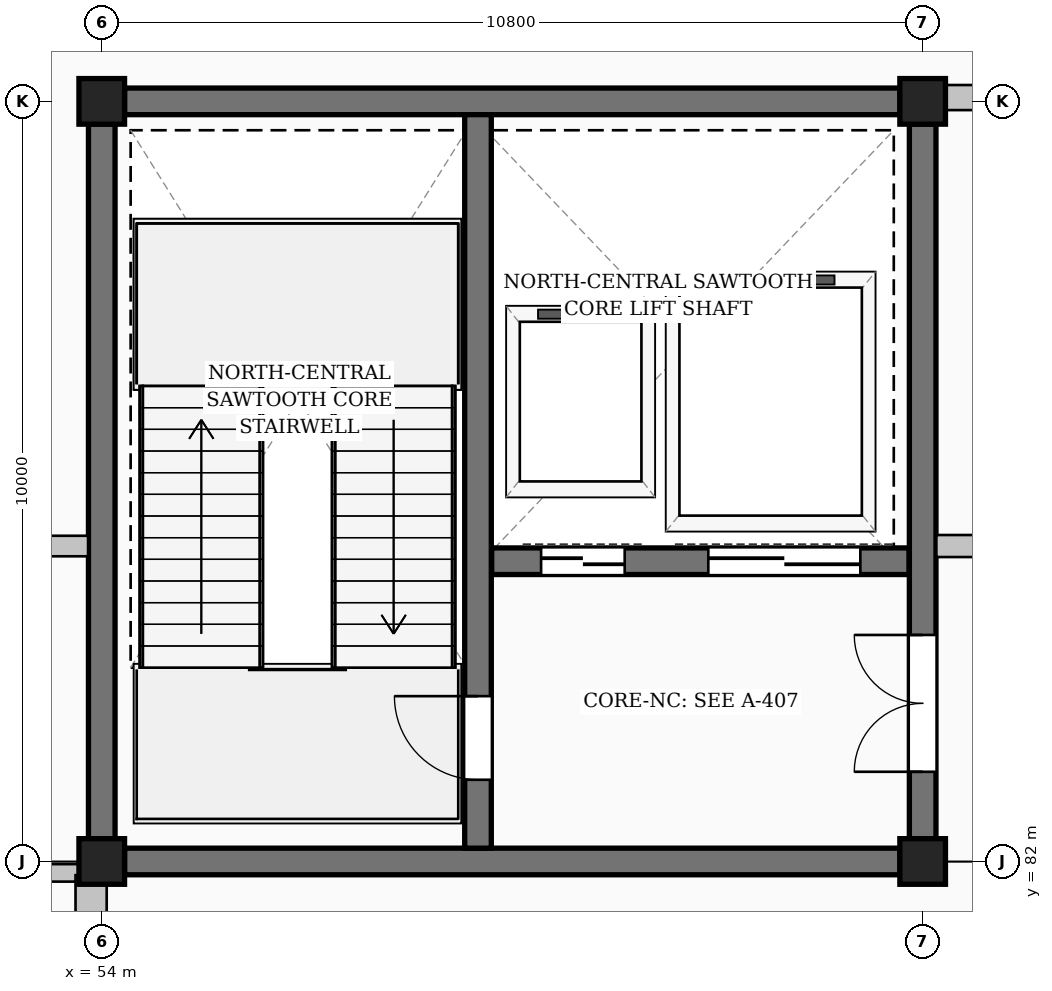
"""IFC4 building model, lengths in metres.
Left out: names, types, materials, properties, quantities, classifications, styles, units other than length and angle.
Written with IfcOpenShell. Run it as: python <this file> out.ifc"""

import sys

from ifc_helpers import new_model, si_unit, direction, frame, frame_2d, origin, origin_2d, place, context, subcontext, project, spatial, rectangle, extrude, element, fill, save


model = new_model("IFC4")
c1 = context("Model", 3, precision=1e-05, world=origin(), true_north=direction((0.0, 1.0)))
c2 = subcontext(c1, "Body", "Model", "MODEL_VIEW")
j1 = project(units=[si_unit("LENGTHUNIT", "METRE"), si_unit("PLANEANGLEUNIT", "RADIAN")], contexts=[c1])
p1 = place(None, origin())
s1 = spatial("IfcSite", under=j1, at=p1, CompositionType="ELEMENT")
p2 = place(p1, origin())
s2 = spatial("IfcBuilding", under=s1, at=p2, CompositionType="ELEMENT")
p3 = place(p2, frame((0.0, 0.0, 14.4)))
s3 = spatial("IfcBuildingStorey", under=s2, at=p3, CompositionType="ELEMENT", Elevation=14.4)
for number, where, z_axis, x_axis in (
    (1, (54.0, 82.0, 0.0), (0.0, 0.0, 1.0), (1.0, 0.0, 0.0)),
    (2, (54.0, 92.0, 0.0), (0.0, 0.0, 1.0), (1.0, 0.0, 0.0)),
    (3, (64.8, 82.0, 0.0), (0.0, 0.0, 1.0), (1.0, 0.0, 0.0)),
    (4, (64.8, 92.0, 0.0), (0.0, 0.0, 1.0), (1.0, 0.0, 0.0)),
):
    element("IfcColumn", number, at=place(p3, frame(where, z_axis=z_axis, x_axis=x_axis)), inside=s3, PredefinedType="COLUMN", context=c2, shape_type="SweptSolid", body=[
        extrude(rectangle(XDim=0.6, YDim=0.6, at=origin_2d()), origin(), (0.0, 0.0, 1.0), 9.6),
    ])
for number, where, z_axis, x_axis in (
    (5, (54.3, 82.0, 0.0), (0.0, 0.0, 1.0), (1.0, 0.0, 0.0)),
    (6, (54.3, 92.0, 0.0), (0.0, 0.0, 1.0), (1.0, 0.0, 0.0)),
):
    element("IfcWall", number, at=place(p3, frame(where, z_axis=z_axis, x_axis=x_axis)), inside=s3, PredefinedType="SHEAR", context=c2, shape_type="SweptSolid", body=[
        extrude(rectangle(XDim=10.2, YDim=0.35, at=frame_2d((5.1, 0.0))), origin(), (0.0, 0.0, 1.0), 9.36),
    ])
p4 = place(p3, frame((54.0, 82.3, 0.0), z_axis=(0.0, 0.0, 1.0), x_axis=(0.0, 1.0, 0.0)))
e7 = element("IfcWall", 7, at=p4, inside=s3, PredefinedType="SHEAR", context=c2, shape_type="SweptSolid", body=[
    extrude(rectangle(XDim=9.4, YDim=0.35, at=frame_2d((4.7, 0.0))), origin(), (0.0, 0.0, 1.0), 9.36),
])
p5 = place(p3, frame((64.8, 82.3, 0.0), z_axis=(0.0, 0.0, 1.0), x_axis=(0.0, 1.0, 0.0)))
e8 = element("IfcWall", 8, at=p5, inside=s3, PredefinedType="SHEAR", context=c2, shape_type="SweptSolid", body=[
    extrude(rectangle(XDim=9.4, YDim=0.35, at=frame_2d((4.7, 0.0))), origin(), (0.0, 0.0, 1.0), 9.36),
])
p6 = place(p5, frame((0.88, 0.0, 0.0)))
e9 = element("IfcOpeningElement", 9, at=p6, cuts=e8, PredefinedType="OPENING", context=c2, shape_type="SweptSolid", body=[
    extrude(rectangle(XDim=1.8, YDim=2.25, at=frame_2d((0.9, 1.125))), frame((0.0, 0.185, 0.0), z_axis=(0.0, -1.0, 0.0), x_axis=(1.0, 0.0, 0.0)), (0.0, 0.0, 1.0), 0.37),
])
p7 = place(p3, frame((58.95, 82.175, 0.0), z_axis=(0.0, 0.0, 1.0), x_axis=(0.0, 1.0, 0.0)))
e10 = element("IfcWall", 10, at=p7, inside=s3, PredefinedType="SHEAR", context=c2, shape_type="SweptSolid", body=[
    extrude(rectangle(XDim=9.65, YDim=0.35, at=frame_2d((4.825, 0.0))), origin(), (0.0, 0.0, 1.0), 9.36),
])
p8 = place(p7, frame((0.9, 0.0, 0.0)))
e11 = element("IfcOpeningElement", 11, at=p8, cuts=e10, PredefinedType="OPENING", context=c2, shape_type="SweptSolid", body=[
    extrude(rectangle(XDim=1.1, YDim=2.2, at=frame_2d((0.55, 1.1))), frame((0.0, 0.185, 0.0), z_axis=(0.0, -1.0, 0.0), x_axis=(1.0, 0.0, 0.0)), (0.0, 0.0, 1.0), 0.37),
])
p9 = place(p3, frame((59.13, 85.95, 0.0), z_axis=(0.0, 0.0, 1.0), x_axis=(1.0, 0.0, 0.0)))
e12 = element("IfcWall", 12, at=p9, inside=s3, PredefinedType="SHEAR", context=c2, shape_type="SweptSolid", body=[
    extrude(rectangle(XDim=5.49, YDim=0.35, at=frame_2d((2.745, 0.0))), origin(), (0.0, 0.0, 1.0), 9.36),
])
p10 = place(p9, frame((0.65, 0.0, 0.0)))
e13 = element("IfcOpeningElement", 13, at=p10, cuts=e12, PredefinedType="OPENING", context=c2, shape_type="SweptSolid", body=[
    extrude(rectangle(XDim=1.1, YDim=2.2, at=frame_2d((0.55, 1.1))), frame((0.0, 0.185, 0.0), z_axis=(0.0, -1.0, 0.0), x_axis=(1.0, 0.0, 0.0)), (0.0, 0.0, 1.0), 0.37),
])
p11 = place(p9, frame((2.85, 0.0, 0.0)))
e14 = element("IfcOpeningElement", 14, at=p11, cuts=e12, PredefinedType="OPENING", context=c2, shape_type="SweptSolid", body=[
    extrude(rectangle(XDim=2.0, YDim=2.5, at=frame_2d((1.0, 1.25))), frame((0.0, 0.185, 0.0), z_axis=(0.0, -1.0, 0.0), x_axis=(1.0, 0.0, 0.0)), (0.0, 0.0, 1.0), 0.37),
])
p12 = place(p3, frame((43.38, 81.85, 0.0), z_axis=(0.0, 0.0, 1.0), x_axis=(1.0, 0.0, 0.0)))
e15 = element("IfcWall", 15, at=p12, inside=s3, PredefinedType="PARTITIONING", context=c2, shape_type="SweptSolid", body=[
    extrude(rectangle(XDim=10.44, YDim=0.23, at=frame_2d((5.22, 0.0))), origin(), (0.0, 0.0, 1.0), 8.96),
])
p13 = place(p12, frame((3.92, 0.0, 0.0)))
e16 = element("IfcOpeningElement", 16, at=p13, cuts=e15, PredefinedType="OPENING", context=c2, shape_type="SweptSolid", body=[
    extrude(rectangle(XDim=2.6, YDim=2.8, at=frame_2d((1.3, 1.4))), frame((0.0, 0.125, 0.0), z_axis=(0.0, -1.0, 0.0), x_axis=(1.0, 0.0, 0.0)), (0.0, 0.0, 1.0), 0.25),
])
p14 = place(p3, frame((25.6, 86.15, 0.0), z_axis=(0.0, 0.0, 1.0), x_axis=(1.0, 0.0, 0.0)))
e17 = element("IfcWall", 17, at=p14, inside=s3, PredefinedType="PARTITIONING", context=c2, shape_type="SweptSolid", body=[
    extrude(rectangle(XDim=28.22, YDim=0.27, at=frame_2d((14.11, 0.0))), origin(), (0.0, 0.0, 1.0), 9.32),
])
p15 = place(p14, frame((12.76, 0.0, 0.0)))
e18 = element("IfcOpeningElement", 18, at=p15, cuts=e17, PredefinedType="OPENING", context=c2, shape_type="SweptSolid", body=[
    extrude(rectangle(XDim=2.7, YDim=2.85, at=frame_2d((1.35, 1.425))), frame((0.0, 0.145, 0.0), z_axis=(0.0, -1.0, 0.0), x_axis=(1.0, 0.0, 0.0)), (0.0, 0.0, 1.0), 0.29),
])
p16 = place(p3, frame((64.98, 86.15, 0.0), z_axis=(0.0, 0.0, 1.0), x_axis=(1.0, 0.0, 0.0)))
e19 = element("IfcWall", 19, at=p16, inside=s3, PredefinedType="PARTITIONING", context=c2, shape_type="SweptSolid", body=[
    extrude(rectangle(XDim=32.04, YDim=0.29, at=frame_2d((16.02, 0.0))), origin(), (0.0, 0.0, 1.0), 9.32),
])
p17 = place(p16, frame((15.51, 0.0, 0.0)))
e20 = element("IfcOpeningElement", 20, at=p17, cuts=e19, PredefinedType="OPENING", context=c2, shape_type="SweptSolid", body=[
    extrude(rectangle(XDim=1.02, YDim=2.18, at=frame_2d((0.51, 1.09))), frame((0.0, 0.155, 0.0), z_axis=(0.0, -1.0, 0.0), x_axis=(1.0, 0.0, 0.0)), (0.0, 0.0, 1.0), 0.31),
])
p18 = place(p3, frame((64.98, 92.05, 0.0), z_axis=(0.0, 0.0, 1.0), x_axis=(1.0, 0.0, 0.0)))
e21 = element("IfcWall", 21, at=p18, inside=s3, PredefinedType="PARTITIONING", context=c2, shape_type="SweptSolid", body=[
    extrude(rectangle(XDim=10.42, YDim=0.33, at=frame_2d((5.21, 0.0))), origin(), (0.0, 0.0, 1.0), 8.92),
])
p19 = place(p18, frame((4.62, 0.0, 0.0)))
e22 = element("IfcOpeningElement", 22, at=p19, cuts=e21, PredefinedType="OPENING", context=c2, shape_type="SweptSolid", body=[
    extrude(rectangle(XDim=1.18, YDim=2.28, at=frame_2d((0.59, 1.14))), frame((0.0, 0.175, 0.0), z_axis=(0.0, -1.0, 0.0), x_axis=(1.0, 0.0, 0.0)), (0.0, 0.0, 1.0), 0.35),
])
p20 = place(p3, frame((53.86, 72.2, 0.0), z_axis=(0.0, 0.0, 1.0), x_axis=(0.0, 1.0, 0.0)))
e23 = element("IfcWall", 23, at=p20, inside=s3, PredefinedType="PARTITIONING", context=c2, shape_type="SweptSolid", body=[
    extrude(rectangle(XDim=9.62, YDim=0.41, at=frame_2d((4.81, 0.0))), origin(), (0.0, 0.0, 1.0), 9.32),
])
p21 = place(p8, origin())
e24 = element("IfcDoor", 24, at=p21, inside=s3, OperationType="SINGLE_SWING_RIGHT", PredefinedType="DOOR", context=c2, shape_type="SweptSolid", body=[
    extrude(rectangle(XDim=1.1, YDim=2.2, at=frame_2d((0.55, 1.1))), frame((0.0, 0.025, 0.0), z_axis=(0.0, -1.0, 0.0), x_axis=(1.0, 0.0, 0.0)), (0.0, 0.0, 1.0), 0.05),
])
fill(e11, e24)
p22 = place(p6, origin())
e25 = element("IfcDoor", 25, at=p22, inside=s3, OperationType="DOUBLE_DOOR_SINGLE_SWING", PredefinedType="DOOR", context=c2, shape_type="SweptSolid", body=[
    extrude(rectangle(XDim=1.8, YDim=2.25, at=frame_2d((0.9, 1.125))), frame((0.0, 0.025, 0.0), z_axis=(0.0, -1.0, 0.0), x_axis=(1.0, 0.0, 0.0)), (0.0, 0.0, 1.0), 0.05),
])
fill(e9, e25)
p23 = place(p10, origin())
e26 = element("IfcDoor", 26, at=p23, inside=s3, OperationType="DOUBLE_DOOR_SLIDING", PredefinedType="DOOR", context=c2, shape_type="SweptSolid", body=[
    extrude(rectangle(XDim=1.1, YDim=2.2, at=frame_2d((0.55, 1.1))), frame((0.0, 0.025, 0.0), z_axis=(0.0, -1.0, 0.0), x_axis=(1.0, 0.0, 0.0)), (0.0, 0.0, 1.0), 0.05),
])
fill(e13, e26)
p24 = place(p11, origin())
e27 = element("IfcDoor", 27, at=p24, inside=s3, OperationType="DOUBLE_DOOR_SLIDING", PredefinedType="DOOR", context=c2, shape_type="SweptSolid", body=[
    extrude(rectangle(XDim=2.0, YDim=2.5, at=frame_2d((1.0, 1.25))), frame((0.0, 0.025, 0.0), z_axis=(0.0, -1.0, 0.0), x_axis=(1.0, 0.0, 0.0)), (0.0, 0.0, 1.0), 0.05),
])
fill(e14, e27)
save(model, sys.argv[1])
